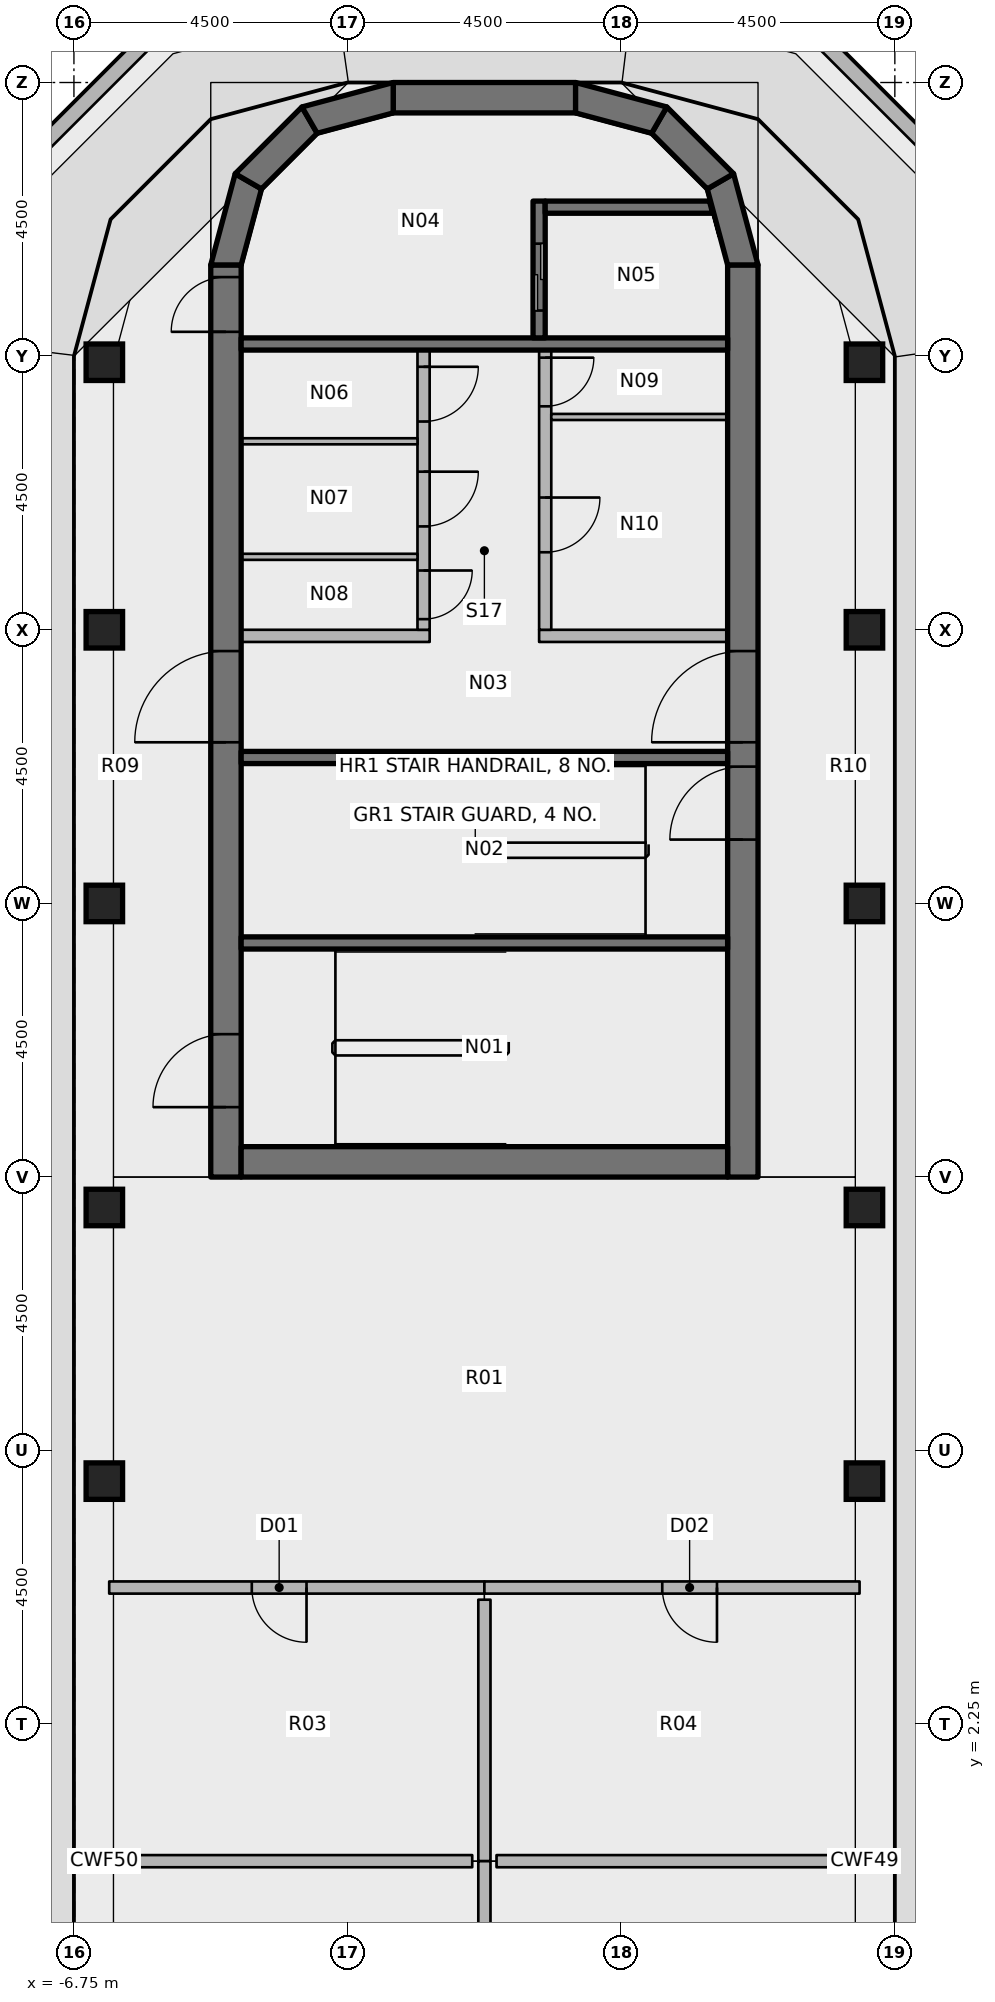
"""IFC4 building model, lengths in metres.
Left out: names, types, materials, properties, quantities, classifications, styles, units other than length and angle.
Written with IfcOpenShell. Run it as: python <this file> out.ifc"""

import sys

from ifc_helpers import new_model, si_unit, direction, frame, frame_2d, origin, origin_2d, place, context, subcontext, project, spatial, polyline, rectangle, outline, extrude, element, fill, save


model = new_model("IFC4")
c1 = context("Model", 3, precision=1e-05, world=origin(), true_north=direction((0.0, 1.0)))
c2 = subcontext(c1, "Body", "Model", "MODEL_VIEW")
j1 = project(units=[si_unit("LENGTHUNIT", "METRE"), si_unit("PLANEANGLEUNIT", "RADIAN")], contexts=[c1])
p1 = place(None, origin())
s1 = spatial("IfcSite", under=j1, at=p1, CompositionType="ELEMENT")
p2 = place(p1, origin())
s2 = spatial("IfcBuilding", under=s1, at=p2, CompositionType="ELEMENT")
p3 = place(p2, frame((0.0, 0.0, 306.0)))
s3 = spatial("IfcBuildingStorey", under=s2, at=p3, CompositionType="ELEMENT", Elevation=306.0)
for number, where, z_axis, x_axis in (
    (1, (-6.25, 6.25, 0.0), (0.0, 0.0, 1.0), (1.0, 0.0, 0.0)),
    (2, (-6.25, 10.75, 0.0), (0.0, 0.0, 1.0), (1.0, 0.0, 0.0)),
    (3, (-6.25, 15.75, 0.0), (0.0, 0.0, 1.0), (1.0, 0.0, 0.0)),
    (4, (-6.25, 20.25, 0.0), (0.0, 0.0, 1.0), (1.0, 0.0, 0.0)),
    (5, (-6.25, 24.65, 0.0), (0.0, 0.0, 1.0), (1.0, 0.0, 0.0)),
    (6, (6.25, 6.25, 0.0), (0.0, 0.0, 1.0), (1.0, 0.0, 0.0)),
    (7, (6.25, 10.75, 0.0), (0.0, 0.0, 1.0), (1.0, 0.0, 0.0)),
    (8, (6.25, 15.75, 0.0), (0.0, 0.0, 1.0), (1.0, 0.0, 0.0)),
    (9, (6.25, 20.25, 0.0), (0.0, 0.0, 1.0), (1.0, 0.0, 0.0)),
    (10, (6.25, 24.65, 0.0), (0.0, 0.0, 1.0), (1.0, 0.0, 0.0)),
):
    element("IfcColumn", number, at=place(p3, frame(where, z_axis=z_axis, x_axis=x_axis)), inside=s3, PredefinedType="COLUMN", context=c2, shape_type="SweptSolid", body=[
        extrude(rectangle(XDim=0.6, YDim=0.6, at=origin_2d()), origin(), (0.0, 0.0, 1.0), 3.45),
    ])
p4 = place(p3, frame((-4.25, 11.25, 0.0), z_axis=(0.0, 0.0, 1.0), x_axis=(0.0, 1.0, 0.0)))
e11 = element("IfcWall", 11, at=p4, inside=s3, PredefinedType="SHEAR", context=c2, shape_type="SweptSolid", body=[
    extrude(rectangle(XDim=15.0, YDim=0.5, at=frame_2d((7.5, 0.0))), origin(), (0.0, 0.0, 1.0), 3.6),
])
p5 = place(p4, frame((7.15, 0.0, 0.0)))
e12 = element("IfcOpeningElement", 12, at=p5, cuts=e11, PredefinedType="OPENING", context=c2, shape_type="SweptSolid", body=[
    extrude(rectangle(XDim=1.5, YDim=2.3, at=frame_2d((0.75, 1.15))), frame((0.0, 0.26, 0.0), z_axis=(0.0, -1.0, 0.0), x_axis=(1.0, 0.0, 0.0)), (0.0, 0.0, 1.0), 0.52),
])
p6 = place(p4, frame((13.9, 0.0, 0.0)))
e13 = element("IfcOpeningElement", 13, at=p6, cuts=e11, PredefinedType="OPENING", context=c2, shape_type="SweptSolid", body=[
    extrude(rectangle(XDim=0.9, YDim=2.1, at=frame_2d((0.45, 1.05))), frame((0.0, 0.26, 0.0), z_axis=(0.0, -1.0, 0.0), x_axis=(1.0, 0.0, 0.0)), (0.0, 0.0, 1.0), 0.52),
])
p7 = place(p4, frame((1.15, 0.0, 0.0)))
e14 = element("IfcOpeningElement", 14, at=p7, cuts=e11, PredefinedType="OPENING", context=c2, shape_type="SweptSolid", body=[
    extrude(rectangle(XDim=1.2, YDim=2.1, at=frame_2d((0.6, 1.05))), frame((0.0, 0.26, 0.0), z_axis=(0.0, -1.0, 0.0), x_axis=(1.0, 0.0, 0.0)), (0.0, 0.0, 1.0), 0.52),
])
p8 = place(p3, frame((4.25, 11.25, 0.0), z_axis=(0.0, 0.0, 1.0), x_axis=(0.0, 1.0, 0.0)))
e15 = element("IfcWall", 15, at=p8, inside=s3, PredefinedType="SHEAR", context=c2, shape_type="SweptSolid", body=[
    extrude(rectangle(XDim=15.0, YDim=0.5, at=frame_2d((7.5, 0.0))), origin(), (0.0, 0.0, 1.0), 3.6),
])
p9 = place(p8, frame((7.15, 0.0, 0.0)))
e16 = element("IfcOpeningElement", 16, at=p9, cuts=e15, PredefinedType="OPENING", context=c2, shape_type="SweptSolid", body=[
    extrude(rectangle(XDim=1.5, YDim=2.3, at=frame_2d((0.75, 1.15))), frame((0.0, 0.26, 0.0), z_axis=(0.0, -1.0, 0.0), x_axis=(1.0, 0.0, 0.0)), (0.0, 0.0, 1.0), 0.52),
])
p10 = place(p8, frame((5.55, 0.0, 0.0)))
e17 = element("IfcOpeningElement", 17, at=p10, cuts=e15, PredefinedType="OPENING", context=c2, shape_type="SweptSolid", body=[
    extrude(rectangle(XDim=1.2, YDim=2.1, at=frame_2d((0.6, 1.05))), frame((0.0, 0.26, 0.0), z_axis=(0.0, -1.0, 0.0), x_axis=(1.0, 0.0, 0.0)), (0.0, 0.0, 1.0), 0.52),
])
p11 = place(p3, frame((-4.0, 11.5, 0.0), z_axis=(0.0, 0.0, 1.0), x_axis=(1.0, 0.0, 0.0)))
e18 = element("IfcWall", 18, at=p11, inside=s3, PredefinedType="SHEAR", context=c2, shape_type="SweptSolid", body=[
    extrude(rectangle(XDim=8.0, YDim=0.5, at=frame_2d((4.0, 0.0))), origin(), (0.0, 0.0, 1.0), 3.6),
])
p12 = place(p3, frame((-1.5, 29.0, 0.0), z_axis=(0.0, 0.0, 1.0), x_axis=(1.0, 0.0, 0.0)))
e19 = element("IfcWall", 19, at=p12, inside=s3, PredefinedType="SHEAR", context=c2, shape_type="SweptSolid", body=[
    extrude(rectangle(XDim=3.0, YDim=0.5, at=frame_2d((1.5, 0.0))), origin(), (0.0, 0.0, 1.0), 3.6),
])
p13 = place(p3, origin())
e20 = element("IfcWall", 20, at=p13, inside=s3, PredefinedType="SHEAR", context=c2, shape_type="SweptSolid", body=[
    extrude(outline(polyline([(-4.5, 26.25), (-4.098, 27.75), (-3.665, 27.5), (-4.0, 26.25), (-4.5, 26.25)])), origin(), (0.0, 0.0, 1.0), 3.6),
])
p14 = place(p3, origin())
e21 = element("IfcWall", 21, at=p14, inside=s3, PredefinedType="SHEAR", context=c2, shape_type="SweptSolid", body=[
    extrude(outline(polyline([(-4.098, 27.75), (-3.0, 28.848), (-2.75, 28.415), (-3.665, 27.5), (-4.098, 27.75)])), origin(), (0.0, 0.0, 1.0), 3.6),
])
p15 = place(p3, origin())
e22 = element("IfcWall", 22, at=p15, inside=s3, PredefinedType="SHEAR", context=c2, shape_type="SweptSolid", body=[
    extrude(outline(polyline([(-3.0, 28.848), (-1.5, 29.25), (-1.5, 28.75), (-2.75, 28.415), (-3.0, 28.848)])), origin(), (0.0, 0.0, 1.0), 3.6),
])
p16 = place(p3, origin())
e23 = element("IfcWall", 23, at=p16, inside=s3, PredefinedType="SHEAR", context=c2, shape_type="SweptSolid", body=[
    extrude(outline(polyline([(4.5, 26.25), (4.098, 27.75), (3.665, 27.5), (4.0, 26.25), (4.5, 26.25)])), origin(), (0.0, 0.0, 1.0), 3.6),
])
p17 = place(p3, origin())
e24 = element("IfcWall", 24, at=p17, inside=s3, PredefinedType="SHEAR", context=c2, shape_type="SweptSolid", body=[
    extrude(outline(polyline([(4.098, 27.75), (3.0, 28.848), (2.75, 28.415), (3.665, 27.5), (4.098, 27.75)])), origin(), (0.0, 0.0, 1.0), 3.6),
])
p18 = place(p3, origin())
e25 = element("IfcWall", 25, at=p18, inside=s3, PredefinedType="SHEAR", context=c2, shape_type="SweptSolid", body=[
    extrude(outline(polyline([(3.0, 28.848), (1.5, 29.25), (1.5, 28.75), (2.75, 28.415), (3.0, 28.848)])), origin(), (0.0, 0.0, 1.0), 3.6),
])
p19 = place(p3, origin())
e26 = element("IfcWall", 26, at=p19, inside=s3, PredefinedType="PARAPET", context=c2, shape_type="SweptSolid", body=[
    extrude(outline(polyline([(-7.743, 27.921), (-5.421, 30.243), (-5.292, 30.019), (-7.519, 27.792), (-7.743, 27.921)])), origin(), (0.0, 0.0, 1.0), 1.22),
])
p20 = place(p3, origin())
e27 = element("IfcWall", 27, at=p20, inside=s3, PredefinedType="PARAPET", context=c2, shape_type="SweptSolid", body=[
    extrude(outline(polyline([(5.421, 30.243), (7.743, 27.921), (7.519, 27.792), (5.292, 30.019), (5.421, 30.243)])), origin(), (0.0, 0.0, 1.0), 1.22),
])
p21 = place(p3, frame((-4.0, 24.95, 0.0), z_axis=(0.0, 0.0, 1.0), x_axis=(1.0, 0.0, 0.0)))
e28 = element("IfcWall", 28, at=p21, inside=s3, PredefinedType="SHEAR", context=c2, shape_type="SweptSolid", body=[
    extrude(rectangle(XDim=8.0, YDim=0.2, at=frame_2d((4.0, 0.0))), origin(), (0.0, 0.0, 1.0), 3.45),
])
p22 = place(p3, frame((0.9, 27.3, 0.0), z_axis=(0.0, 0.0, 1.0), x_axis=(0.0, -1.0, 0.0)))
e29 = element("IfcWall", 29, at=p22, inside=s3, PredefinedType="SHEAR", context=c2, shape_type="SweptSolid", body=[
    extrude(rectangle(XDim=2.25, YDim=0.2, at=frame_2d((1.125, 0.0))), origin(), (0.0, 0.0, 1.0), 3.45),
])
p23 = place(p22, frame((0.7, 0.0, 0.0)))
e30 = element("IfcOpeningElement", 30, at=p23, cuts=e29, PredefinedType="OPENING", context=c2, shape_type="SweptSolid", body=[
    extrude(rectangle(XDim=1.1, YDim=2.3, at=frame_2d((0.55, 1.15))), frame((0.0, 0.11, 0.0), z_axis=(0.0, -1.0, 0.0), x_axis=(1.0, 0.0, 0.0)), (0.0, 0.0, 1.0), 0.22),
])
p24 = place(p3, origin())
e31 = element("IfcWall", 31, at=p24, inside=s3, PredefinedType="SHEAR", context=c2, shape_type="SweptSolid", body=[
    extrude(outline(polyline([(1.0, 27.1), (3.755, 27.1), (3.701, 27.3), (1.0, 27.3), (1.0, 27.1)])), origin(), (0.0, 0.0, 1.0), 3.45),
])
for number, where, z_axis, x_axis in (
    (32, (-4.0, 18.15, 0.0), (0.0, 0.0, 1.0), (1.0, 0.0, 0.0)),
    (33, (-4.0, 15.1, 0.0), (0.0, 0.0, 1.0), (1.0, 0.0, 0.0)),
):
    element("IfcWall", number, at=place(p3, frame(where, z_axis=z_axis, x_axis=x_axis)), inside=s3, PredefinedType="SHEAR", context=c2, shape_type="SweptSolid", body=[
        extrude(rectangle(XDim=8.0, YDim=0.2, at=frame_2d((4.0, 0.0))), origin(), (0.0, 0.0, 1.0), 3.45),
    ])
p25 = place(p3, frame((-4.0, 20.15, 0.0), z_axis=(0.0, 0.0, 1.0), x_axis=(1.0, 0.0, 0.0)))
e34 = element("IfcWall", 34, at=p25, inside=s3, PredefinedType="PARTITIONING", context=c2, shape_type="SweptSolid", body=[
    extrude(rectangle(XDim=3.1, YDim=0.2, at=frame_2d((1.55, 0.0))), origin(), (0.0, 0.0, 1.0), 3.45),
])
p26 = place(p3, frame((-1.0, 24.85, 0.0), z_axis=(0.0, 0.0, 1.0), x_axis=(0.0, -1.0, 0.0)))
e35 = element("IfcWall", 35, at=p26, inside=s3, PredefinedType="PARTITIONING", context=c2, shape_type="SweptSolid", body=[
    extrude(rectangle(XDim=4.6, YDim=0.2, at=frame_2d((2.3, 0.0))), origin(), (0.0, 0.0, 1.0), 3.45),
])
p27 = place(p26, frame((0.275, 0.0, 0.0)))
e36 = element("IfcOpeningElement", 36, at=p27, cuts=e35, PredefinedType="OPENING", context=c2, shape_type="SweptSolid", body=[
    extrude(rectangle(XDim=0.9, YDim=2.1, at=frame_2d((0.45, 1.05))), frame((0.0, 0.11, 0.0), z_axis=(0.0, -1.0, 0.0), x_axis=(1.0, 0.0, 0.0)), (0.0, 0.0, 1.0), 0.22),
])
p28 = place(p26, frame((2.0, 0.0, 0.0)))
e37 = element("IfcOpeningElement", 37, at=p28, cuts=e35, PredefinedType="OPENING", context=c2, shape_type="SweptSolid", body=[
    extrude(rectangle(XDim=0.9, YDim=2.1, at=frame_2d((0.45, 1.05))), frame((0.0, 0.11, 0.0), z_axis=(0.0, -1.0, 0.0), x_axis=(1.0, 0.0, 0.0)), (0.0, 0.0, 1.0), 0.22),
])
p29 = place(p26, frame((3.625, 0.0, 0.0)))
e38 = element("IfcOpeningElement", 38, at=p29, cuts=e35, PredefinedType="OPENING", context=c2, shape_type="SweptSolid", body=[
    extrude(rectangle(XDim=0.8, YDim=2.1, at=frame_2d((0.4, 1.05))), frame((0.0, 0.11, 0.0), z_axis=(0.0, -1.0, 0.0), x_axis=(1.0, 0.0, 0.0)), (0.0, 0.0, 1.0), 0.22),
])
p30 = place(p3, frame((0.9, 20.15, 0.0), z_axis=(0.0, 0.0, 1.0), x_axis=(1.0, 0.0, 0.0)))
e39 = element("IfcWall", 39, at=p30, inside=s3, PredefinedType="PARTITIONING", context=c2, shape_type="SweptSolid", body=[
    extrude(rectangle(XDim=3.1, YDim=0.2, at=frame_2d((1.55, 0.0))), origin(), (0.0, 0.0, 1.0), 3.45),
])
p31 = place(p3, frame((1.0, 24.85, 0.0), z_axis=(0.0, 0.0, 1.0), x_axis=(0.0, -1.0, 0.0)))
e40 = element("IfcWall", 40, at=p31, inside=s3, PredefinedType="PARTITIONING", context=c2, shape_type="SweptSolid", body=[
    extrude(rectangle(XDim=4.6, YDim=0.2, at=frame_2d((2.3, 0.0))), origin(), (0.0, 0.0, 1.0), 3.45),
])
p32 = place(p31, frame((0.125, 0.0, 0.0)))
e41 = element("IfcOpeningElement", 41, at=p32, cuts=e40, PredefinedType="OPENING", context=c2, shape_type="SweptSolid", body=[
    extrude(rectangle(XDim=0.8, YDim=2.1, at=frame_2d((0.4, 1.05))), frame((0.0, 0.11, 0.0), z_axis=(0.0, -1.0, 0.0), x_axis=(1.0, 0.0, 0.0)), (0.0, 0.0, 1.0), 0.22),
])
p33 = place(p31, frame((2.425, 0.0, 0.0)))
e42 = element("IfcOpeningElement", 42, at=p33, cuts=e40, PredefinedType="OPENING", context=c2, shape_type="SweptSolid", body=[
    extrude(rectangle(XDim=0.9, YDim=2.1, at=frame_2d((0.45, 1.05))), frame((0.0, 0.11, 0.0), z_axis=(0.0, -1.0, 0.0), x_axis=(1.0, 0.0, 0.0)), (0.0, 0.0, 1.0), 0.22),
])
for number, where, z_axis, x_axis in (
    (43, (-4.0, 23.35, 0.0), (0.0, 0.0, 1.0), (1.0, 0.0, 0.0)),
    (44, (-4.0, 21.45, 0.0), (0.0, 0.0, 1.0), (1.0, 0.0, 0.0)),
    (45, (1.1, 23.75, 0.0), (0.0, 0.0, 1.0), (1.0, 0.0, 0.0)),
):
    element("IfcWall", number, at=place(p3, frame(where, z_axis=z_axis, x_axis=x_axis)), inside=s3, PredefinedType="PARTITIONING", context=c2, shape_type="SweptSolid", body=[
        extrude(rectangle(XDim=2.9, YDim=0.1, at=frame_2d((1.45, 0.0))), origin(), (0.0, 0.0, 1.0), 3.45),
    ])
p34 = place(p3, frame((0.0, 4.5, 0.0), z_axis=(0.0, 0.0, 1.0), x_axis=(-1.0, 0.0, 0.0)))
e46 = element("IfcWall", 46, at=p34, inside=s3, PredefinedType="PARTITIONING", context=c2, shape_type="SweptSolid", body=[
    extrude(rectangle(XDim=6.17, YDim=0.2, at=frame_2d((3.085, 0.0))), origin(), (0.0, 0.0, 1.0), 3.45),
])
p35 = place(p34, frame((2.925, 0.0, 0.0)))
e47 = element("IfcOpeningElement", 47, at=p35, cuts=e46, PredefinedType="OPENING", context=c2, shape_type="SweptSolid", body=[
    extrude(rectangle(XDim=0.9, YDim=2.1, at=frame_2d((0.45, 1.05))), frame((0.0, 0.11, 0.0), z_axis=(0.0, -1.0, 0.0), x_axis=(1.0, 0.0, 0.0)), (0.0, 0.0, 1.0), 0.22),
])
p36 = place(p3, frame((6.17, 4.5, 0.0), z_axis=(0.0, 0.0, 1.0), x_axis=(-1.0, 0.0, 0.0)))
e48 = element("IfcWall", 48, at=p36, inside=s3, PredefinedType="PARTITIONING", context=c2, shape_type="SweptSolid", body=[
    extrude(rectangle(XDim=6.17, YDim=0.2, at=frame_2d((3.085, 0.0))), origin(), (0.0, 0.0, 1.0), 3.45),
])
p37 = place(p36, frame((2.345, 0.0, 0.0)))
e49 = element("IfcOpeningElement", 49, at=p37, cuts=e48, PredefinedType="OPENING", context=c2, shape_type="SweptSolid", body=[
    extrude(rectangle(XDim=0.9, YDim=2.1, at=frame_2d((0.45, 1.05))), frame((0.0, 0.11, 0.0), z_axis=(0.0, -1.0, 0.0), x_axis=(1.0, 0.0, 0.0)), (0.0, 0.0, 1.0), 0.22),
])
p38 = place(p3, frame((0.0, 4.3, 0.0), z_axis=(0.0, 0.0, 1.0), x_axis=(0.0, -1.0, 0.0)))
e50 = element("IfcWall", 50, at=p38, inside=s3, PredefinedType="PARTITIONING", context=c2, shape_type="SweptSolid", body=[
    extrude(rectangle(XDim=4.3, YDim=0.2, at=frame_2d((2.15, 0.0))), origin(), (0.0, 0.0, 1.0), 2.828),
])
for number, where, z_axis, x_axis in (
    (51, (-0.2, 0.0, 0.0), (0.0, 0.0, 1.0), (-1.0, 0.0, 0.0)),
    (52, (6.17, 0.0, 0.0), (0.0, 0.0, 1.0), (-1.0, 0.0, 0.0)),
):
    element("IfcWall", number, at=place(p3, frame(where, z_axis=z_axis, x_axis=x_axis)), inside=s3, PredefinedType="PARTITIONING", context=c2, shape_type="SweptSolid", body=[
        extrude(rectangle(XDim=5.97, YDim=0.2, at=frame_2d((2.985, 0.0))), origin(), (0.0, 0.0, 1.0), 3.45),
    ])
p39 = place(p3, frame((0.0, 0.0, 0.0), z_axis=(0.0, 0.0, 1.0), x_axis=(0.0, -1.0, 0.0)))
e53 = element("IfcWall", 53, at=p39, inside=s3, PredefinedType="PARTITIONING", context=c2, shape_type="SweptSolid", body=[
    extrude(rectangle(XDim=4.3, YDim=0.2, at=frame_2d((2.15, 0.0))), origin(), (0.0, 0.0, 1.0), 2.828),
])
p40 = place(p5, origin())
e54 = element("IfcDoor", 54, at=p40, inside=s3, OperationType="DOUBLE_DOOR_SINGLE_SWING", PredefinedType="DOOR", context=c2, shape_type="SweptSolid", body=[
    extrude(rectangle(XDim=1.5, YDim=2.3, at=frame_2d((0.75, 1.15))), frame((0.0, 0.025, 0.0), z_axis=(0.0, -1.0, 0.0), x_axis=(1.0, 0.0, 0.0)), (0.0, 0.0, 1.0), 0.05),
])
fill(e12, e54)
p41 = place(p9, origin())
e55 = element("IfcDoor", 55, at=p41, inside=s3, OperationType="DOUBLE_DOOR_SINGLE_SWING", PredefinedType="DOOR", context=c2, shape_type="SweptSolid", body=[
    extrude(rectangle(XDim=1.5, YDim=2.3, at=frame_2d((0.75, 1.15))), frame((0.0, 0.025, 0.0), z_axis=(0.0, -1.0, 0.0), x_axis=(1.0, 0.0, 0.0)), (0.0, 0.0, 1.0), 0.05),
])
fill(e16, e55)
p42 = place(p6, origin())
e56 = element("IfcDoor", 56, at=p42, inside=s3, OperationType="SINGLE_SWING_LEFT", PredefinedType="DOOR", context=c2, shape_type="SweptSolid", body=[
    extrude(rectangle(XDim=0.9, YDim=2.1, at=frame_2d((0.45, 1.05))), frame((0.0, 0.025, 0.0), z_axis=(0.0, -1.0, 0.0), x_axis=(1.0, 0.0, 0.0)), (0.0, 0.0, 1.0), 0.05),
])
fill(e13, e56)
p43 = place(p10, origin())
e57 = element("IfcDoor", 57, at=p43, inside=s3, OperationType="SINGLE_SWING_RIGHT", PredefinedType="DOOR", context=c2, shape_type="SweptSolid", body=[
    extrude(rectangle(XDim=1.2, YDim=2.1, at=frame_2d((0.6, 1.05))), frame((0.0, 0.025, 0.0), z_axis=(0.0, -1.0, 0.0), x_axis=(1.0, 0.0, 0.0)), (0.0, 0.0, 1.0), 0.05),
])
fill(e17, e57)
p44 = place(p7, origin())
e58 = element("IfcDoor", 58, at=p44, inside=s3, OperationType="SINGLE_SWING_LEFT", PredefinedType="DOOR", context=c2, shape_type="SweptSolid", body=[
    extrude(rectangle(XDim=1.2, YDim=2.1, at=frame_2d((0.6, 1.05))), frame((0.0, 0.025, 0.0), z_axis=(0.0, -1.0, 0.0), x_axis=(1.0, 0.0, 0.0)), (0.0, 0.0, 1.0), 0.05),
])
fill(e14, e58)
p45 = place(p23, origin())
e59 = element("IfcDoor", 59, at=p45, inside=s3, OperationType="DOUBLE_DOOR_SLIDING", PredefinedType="DOOR", context=c2, shape_type="SweptSolid", body=[
    extrude(rectangle(XDim=1.1, YDim=2.3, at=frame_2d((0.55, 1.15))), frame((0.0, 0.025, 0.0), z_axis=(0.0, -1.0, 0.0), x_axis=(1.0, 0.0, 0.0)), (0.0, 0.0, 1.0), 0.05),
])
fill(e30, e59)
p46 = place(p27, origin())
e60 = element("IfcDoor", 60, at=p46, inside=s3, OperationType="SINGLE_SWING_RIGHT", PredefinedType="DOOR", context=c2, shape_type="SweptSolid", body=[
    extrude(rectangle(XDim=0.9, YDim=2.1, at=frame_2d((0.45, 1.05))), frame((0.0, 0.025, 0.0), z_axis=(0.0, -1.0, 0.0), x_axis=(1.0, 0.0, 0.0)), (0.0, 0.0, 1.0), 0.05),
])
fill(e36, e60)
p47 = place(p28, origin())
e61 = element("IfcDoor", 61, at=p47, inside=s3, OperationType="SINGLE_SWING_RIGHT", PredefinedType="DOOR", context=c2, shape_type="SweptSolid", body=[
    extrude(rectangle(XDim=0.9, YDim=2.1, at=frame_2d((0.45, 1.05))), frame((0.0, 0.025, 0.0), z_axis=(0.0, -1.0, 0.0), x_axis=(1.0, 0.0, 0.0)), (0.0, 0.0, 1.0), 0.05),
])
fill(e37, e61)
p48 = place(p29, origin())
e62 = element("IfcDoor", 62, at=p48, inside=s3, OperationType="SINGLE_SWING_LEFT", PredefinedType="DOOR", context=c2, shape_type="SweptSolid", body=[
    extrude(rectangle(XDim=0.8, YDim=2.1, at=frame_2d((0.4, 1.05))), frame((0.0, 0.025, 0.0), z_axis=(0.0, -1.0, 0.0), x_axis=(1.0, 0.0, 0.0)), (0.0, 0.0, 1.0), 0.05),
])
fill(e38, e62)
p49 = place(p32, origin())
e63 = element("IfcDoor", 63, at=p49, inside=s3, OperationType="SINGLE_SWING_LEFT", PredefinedType="DOOR", context=c2, shape_type="SweptSolid", body=[
    extrude(rectangle(XDim=0.8, YDim=2.1, at=frame_2d((0.4, 1.05))), frame((0.0, 0.025, 0.0), z_axis=(0.0, -1.0, 0.0), x_axis=(1.0, 0.0, 0.0)), (0.0, 0.0, 1.0), 0.05),
])
fill(e41, e63)
p50 = place(p33, origin())
e64 = element("IfcDoor", 64, at=p50, inside=s3, OperationType="SINGLE_SWING_LEFT", PredefinedType="DOOR", context=c2, shape_type="SweptSolid", body=[
    extrude(rectangle(XDim=0.9, YDim=2.1, at=frame_2d((0.45, 1.05))), frame((0.0, 0.025, 0.0), z_axis=(0.0, -1.0, 0.0), x_axis=(1.0, 0.0, 0.0)), (0.0, 0.0, 1.0), 0.05),
])
fill(e42, e64)
p51 = place(p35, origin())
e65 = element("IfcDoor", 65, at=p51, inside=s3, OperationType="SINGLE_SWING_LEFT", PredefinedType="DOOR", context=c2, shape_type="SweptSolid", body=[
    extrude(rectangle(XDim=0.9, YDim=2.1, at=frame_2d((0.45, 1.05))), frame((0.0, 0.025, 0.0), z_axis=(0.0, -1.0, 0.0), x_axis=(1.0, 0.0, 0.0)), (0.0, 0.0, 1.0), 0.05),
])
fill(e47, e65)
p52 = place(p37, origin())
e66 = element("IfcDoor", 66, at=p52, inside=s3, OperationType="SINGLE_SWING_LEFT", PredefinedType="DOOR", context=c2, shape_type="SweptSolid", body=[
    extrude(rectangle(XDim=0.9, YDim=2.1, at=frame_2d((0.45, 1.05))), frame((0.0, 0.025, 0.0), z_axis=(0.0, -1.0, 0.0), x_axis=(1.0, 0.0, 0.0)), (0.0, 0.0, 1.0), 0.05),
])
fill(e49, e66)
save(model, sys.argv[1])
